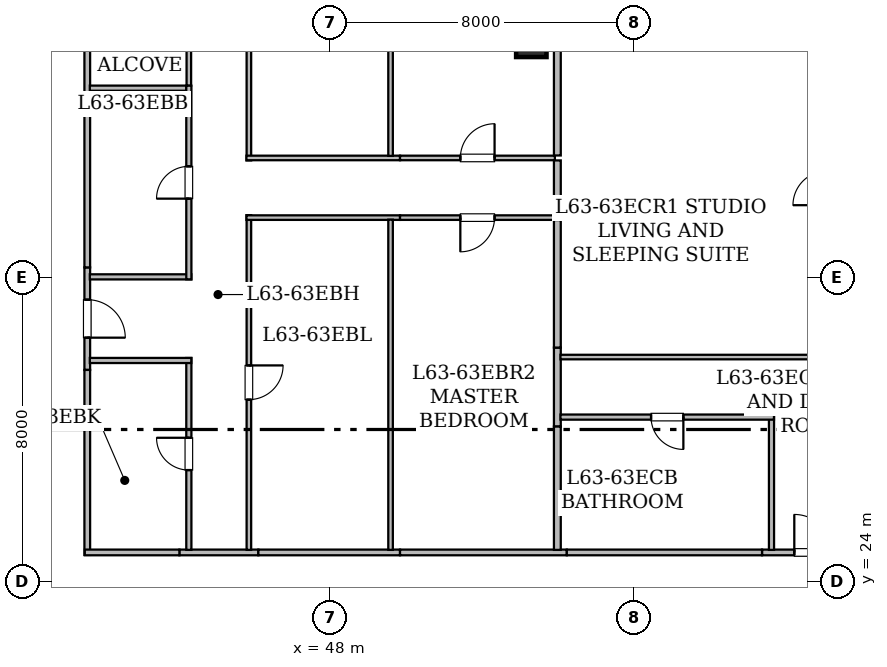
"""IFC4 building model, lengths in metres.
Left out: names, types, materials, properties, quantities, classifications, styles, units other than length and angle.
Written with IfcOpenShell. Run it as: python <this file> out.ifc"""

import sys

from ifc_helpers import new_model, si_unit, direction, frame, frame_2d, origin, origin_2d, place, context, subcontext, project, spatial, rectangle, hollow_rectangle, extrude, element, fill, save


model = new_model("IFC4")
c1 = context("Model", 3, precision=1e-05, world=origin(), true_north=direction((0.0, 1.0)))
c2 = subcontext(c1, "Body", "Model", "MODEL_VIEW")
j1 = project(units=[si_unit("LENGTHUNIT", "METRE"), si_unit("PLANEANGLEUNIT", "RADIAN")], contexts=[c1])
p1 = place(None, origin())
s1 = spatial("IfcSite", under=j1, at=p1, CompositionType="ELEMENT")
p2 = place(p1, origin())
s2 = spatial("IfcBuilding", under=s1, at=p2, CompositionType="ELEMENT")
p3 = place(p2, frame((0.0, 0.0, 246.4)))
s3 = spatial("IfcBuildingStorey", under=s2, at=p3, CompositionType="ELEMENT", Elevation=246.4)
p4 = place(p3, frame((53.3, 38.2, 0.0), z_axis=(0.0, 0.0, 1.0), x_axis=(1.0, 0.0, 0.0)))
e1 = element("IfcColumn", 1, at=p4, inside=s3, PredefinedType="COLUMN", context=c2, shape_type="SweptSolid", body=[
    extrude(hollow_rectangle(XDim=0.8, YDim=0.8, WallThickness=0.04, at=origin_2d()), origin(), (0.0, 0.0, 1.0), 3.65),
])
p5 = place(p3, frame((41.615, 39.1, 0.0), z_axis=(0.0, 0.0, 1.0), x_axis=(0.0, -1.0, 0.0)))
e2 = element("IfcWall", 2, at=p5, inside=s3, PredefinedType="STANDARD", context=c2, shape_type="SweptSolid", body=[
    extrude(rectangle(XDim=2.368, YDim=0.15, at=frame_2d((1.184, 0.0))), origin(), (0.0, 0.0, 1.0), 2.725),
])
p6 = place(p3, frame((41.615, 32.265, 0.0), z_axis=(0.0, 0.0, 1.0), x_axis=(0.0, -1.0, 0.0)))
e3 = element("IfcWall", 3, at=p6, inside=s3, PredefinedType="STANDARD", context=c2, shape_type="SweptSolid", body=[
    extrude(rectangle(XDim=2.698, YDim=0.15, at=frame_2d((1.349, 0.0))), origin(), (0.0, 0.0, 1.0), 3.43),
])
p7 = place(p6, frame((0.849, 0.0, 0.0)))
e4 = element("IfcOpeningElement", 4, at=p7, cuts=e3, PredefinedType="OPENING", context=c2, shape_type="SweptSolid", body=[
    extrude(rectangle(XDim=1.0, YDim=2.15, at=frame_2d((0.5, 1.075))), frame((0.0, 0.085, 0.0), z_axis=(0.0, -1.0, 0.0), x_axis=(1.0, 0.0, 0.0)), (0.0, 0.0, 1.0), 0.17),
])
p8 = place(p3, frame((44.039, 24.765, 0.0), z_axis=(0.0, 0.0, 1.0), x_axis=(1.0, 0.0, 0.0)))
e5 = element("IfcWall", 5, at=p8, inside=s3, PredefinedType="STANDARD", context=c2, shape_type="SweptSolid", body=[
    extrude(rectangle(XDim=2.078, YDim=0.15, at=frame_2d((1.039, 0.0))), origin(), (0.0, 0.0, 1.0), 3.43),
])
p9 = place(p3, frame((41.615, 36.732, 0.0), z_axis=(0.0, 0.0, 1.0), x_axis=(0.0, -1.0, 0.0)))
e6 = element("IfcWall", 6, at=p9, inside=s3, PredefinedType="STANDARD", context=c2, shape_type="SweptSolid", body=[
    extrude(rectangle(XDim=4.467, YDim=0.15, at=frame_2d((2.233, 0.0))), origin(), (0.0, 0.0, 1.0), 2.957),
])
p10 = place(p3, frame((41.615, 29.567, 0.0), z_axis=(0.0, 0.0, 1.0), x_axis=(0.0, -1.0, 0.0)))
e7 = element("IfcWall", 7, at=p10, inside=s3, PredefinedType="STANDARD", context=c2, shape_type="SweptSolid", body=[
    extrude(rectangle(XDim=4.867, YDim=0.15, at=frame_2d((2.434, 0.0))), origin(), (0.0, 0.0, 1.0), 3.43),
])
p11 = place(p3, frame((41.55, 24.765, 0.0), z_axis=(0.0, 0.0, 1.0), x_axis=(1.0, 0.0, 0.0)))
e8 = element("IfcWall", 8, at=p11, inside=s3, PredefinedType="STANDARD", context=c2, shape_type="SweptSolid", body=[
    extrude(rectangle(XDim=2.489, YDim=0.15, at=frame_2d((1.245, 0.0))), origin(), (0.0, 0.0, 1.0), 3.43),
])
p12 = place(p3, frame((46.117, 24.765, 0.0), z_axis=(0.0, 0.0, 1.0), x_axis=(1.0, 0.0, 0.0)))
e9 = element("IfcWall", 9, at=p12, inside=s3, PredefinedType="STANDARD", context=c2, shape_type="SweptSolid", body=[
    extrude(rectangle(XDim=3.728, YDim=0.15, at=frame_2d((1.864, 0.0))), origin(), (0.0, 0.0, 1.0), 3.43),
])
p13 = place(p3, frame((49.845, 24.765, 0.0), z_axis=(0.0, 0.0, 1.0), x_axis=(1.0, 0.0, 0.0)))
e10 = element("IfcWall", 10, at=p13, inside=s3, PredefinedType="STANDARD", context=c2, shape_type="SweptSolid", body=[
    extrude(rectangle(XDim=4.389, YDim=0.15, at=frame_2d((2.194, 0.0))), origin(), (0.0, 0.0, 1.0), 2.725),
])
p14 = place(p3, frame((59.371, 24.765, 0.0), z_axis=(0.0, 0.0, 1.0), x_axis=(1.0, 0.0, 0.0)))
e11 = element("IfcWall", 11, at=p14, inside=s3, PredefinedType="STANDARD", context=c2, shape_type="SweptSolid", body=[
    extrude(rectangle(XDim=2.698, YDim=0.15, at=frame_2d((1.349, 0.0))), origin(), (0.0, 0.0, 1.0), 3.43),
])
p15 = place(p14, frame((0.849, 0.0, 0.0)))
e12 = element("IfcOpeningElement", 12, at=p15, cuts=e11, PredefinedType="OPENING", context=c2, shape_type="SweptSolid", body=[
    extrude(rectangle(XDim=1.0, YDim=2.15, at=frame_2d((0.5, 1.075))), frame((0.0, 0.085, 0.0), z_axis=(0.0, -1.0, 0.0), x_axis=(1.0, 0.0, 0.0)), (0.0, 0.0, 1.0), 0.17),
])
p16 = place(p3, frame((54.234, 24.765, 0.0), z_axis=(0.0, 0.0, 1.0), x_axis=(1.0, 0.0, 0.0)))
e13 = element("IfcWall", 13, at=p16, inside=s3, PredefinedType="STANDARD", context=c2, shape_type="SweptSolid", body=[
    extrude(rectangle(XDim=5.137, YDim=0.15, at=frame_2d((2.569, 0.0))), origin(), (0.0, 0.0, 1.0), 3.43),
])
p17 = place(p3, frame((44.288, 43.808, 0.0), z_axis=(0.0, 0.0, 1.0), x_axis=(0.0, -1.0, 0.0)))
e14 = element("IfcWall", 14, at=p17, inside=s3, PredefinedType="PARTITIONING", context=c2, shape_type="SweptSolid", body=[
    extrude(rectangle(XDim=6.762, YDim=0.12, at=frame_2d((3.381, 0.0))), origin(), (0.0, 0.0, 1.0), 2.725),
])
p18 = place(p17, frame((2.931, 0.0, 0.0)))
e15 = element("IfcOpeningElement", 15, at=p18, cuts=e14, PredefinedType="OPENING", context=c2, shape_type="SweptSolid", body=[
    extrude(rectangle(XDim=0.9, YDim=2.1, at=frame_2d((0.45, 1.05))), frame((0.0, 0.07, 0.0), z_axis=(0.0, -1.0, 0.0), x_axis=(1.0, 0.0, 0.0)), (0.0, 0.0, 1.0), 0.14),
])
p19 = place(p3, frame((44.223, 36.981, 0.0), z_axis=(0.0, 0.0, 1.0), x_axis=(-1.0, 0.0, 0.0)))
e16 = element("IfcWall", 16, at=p19, inside=s3, PredefinedType="PARTITIONING", context=c2, shape_type="SweptSolid", body=[
    extrude(rectangle(XDim=2.541, YDim=0.135, at=frame_2d((1.271, 0.0))), origin(), (0.0, 0.0, 1.0), 2.725),
])
p20 = place(p3, frame((41.682, 32.016, 0.0), z_axis=(0.0, 0.0, 1.0), x_axis=(1.0, 0.0, 0.0)))
e17 = element("IfcWall", 17, at=p20, inside=s3, PredefinedType="PARTITIONING", context=c2, shape_type="SweptSolid", body=[
    extrude(rectangle(XDim=2.671, YDim=0.135, at=frame_2d((1.335, 0.0))), origin(), (0.0, 0.0, 1.0), 3.43),
])
p21 = place(p3, frame((44.288, 31.951, 0.0), z_axis=(0.0, 0.0, 1.0), x_axis=(0.0, 1.0, 0.0)))
e18 = element("IfcWall", 18, at=p21, inside=s3, PredefinedType="PARTITIONING", context=c2, shape_type="SweptSolid", body=[
    extrude(rectangle(XDim=5.095, YDim=0.135, at=frame_2d((2.547, 0.0))), origin(), (0.0, 0.0, 1.0), 2.957),
])
p22 = place(p21, frame((2.123, 0.0, 0.0)))
e19 = element("IfcOpeningElement", 19, at=p22, cuts=e18, PredefinedType="OPENING", context=c2, shape_type="SweptSolid", body=[
    extrude(rectangle(XDim=0.85, YDim=2.1, at=frame_2d((0.425, 1.05))), frame((0.0, 0.077, 0.0), z_axis=(0.0, -1.0, 0.0), x_axis=(1.0, 0.0, 0.0)), (0.0, 0.0, 1.0), 0.155),
])
p23 = place(p3, frame((44.288, 24.832, 0.0), z_axis=(0.0, 0.0, 1.0), x_axis=(0.0, 1.0, 0.0)))
e20 = element("IfcWall", 20, at=p23, inside=s3, PredefinedType="PARTITIONING", context=c2, shape_type="SweptSolid", body=[
    extrude(rectangle(XDim=5.049, YDim=0.135, at=frame_2d((2.524, 0.0))), origin(), (0.0, 0.0, 1.0), 3.43),
])
p24 = place(p23, frame((2.1, 0.0, 0.0)))
e21 = element("IfcOpeningElement", 21, at=p24, cuts=e20, PredefinedType="OPENING", context=c2, shape_type="SweptSolid", body=[
    extrude(rectangle(XDim=0.85, YDim=2.1, at=frame_2d((0.425, 1.05))), frame((0.0, 0.077, 0.0), z_axis=(0.0, -1.0, 0.0), x_axis=(1.0, 0.0, 0.0)), (0.0, 0.0, 1.0), 0.155),
])
p25 = place(p3, frame((44.353, 29.816, 0.0), z_axis=(0.0, 0.0, 1.0), x_axis=(-1.0, 0.0, 0.0)))
e22 = element("IfcWall", 22, at=p25, inside=s3, PredefinedType="PARTITIONING", context=c2, shape_type="SweptSolid", body=[
    extrude(rectangle(XDim=2.671, YDim=0.135, at=frame_2d((1.335, 0.0))), origin(), (0.0, 0.0, 1.0), 3.43),
])
p26 = place(p3, frame((45.868, 33.64, 0.0), z_axis=(0.0, 0.0, 1.0), x_axis=(0.0, -1.0, 0.0)))
e23 = element("IfcWall", 23, at=p26, inside=s3, PredefinedType="PARTITIONING", context=c2, shape_type="SweptSolid", body=[
    extrude(rectangle(XDim=8.808, YDim=0.12, at=frame_2d((4.404, 0.0))), origin(), (0.0, 0.0, 1.0), 2.957),
])
p27 = place(p26, frame((3.954, 0.0, 0.0)))
e24 = element("IfcOpeningElement", 24, at=p27, cuts=e23, PredefinedType="OPENING", context=c2, shape_type="SweptSolid", body=[
    extrude(rectangle(XDim=0.9, YDim=2.1, at=frame_2d((0.45, 1.05))), frame((0.0, 0.07, 0.0), z_axis=(0.0, -1.0, 0.0), x_axis=(1.0, 0.0, 0.0)), (0.0, 0.0, 1.0), 0.14),
])
p28 = place(p3, frame((49.845, 33.575, 0.0), z_axis=(0.0, 0.0, 1.0), x_axis=(-1.0, 0.0, 0.0)))
e25 = element("IfcWall", 25, at=p28, inside=s3, PredefinedType="PARTITIONING", context=c2, shape_type="SweptSolid", body=[
    extrude(rectangle(XDim=4.042, YDim=0.12, at=frame_2d((2.021, 0.0))), origin(), (0.0, 0.0, 1.0), 2.957),
])
p29 = place(p3, frame((53.92, 33.575, 0.0), z_axis=(0.0, 0.0, 1.0), x_axis=(-1.0, 0.0, 0.0)))
e26 = element("IfcWall", 26, at=p29, inside=s3, PredefinedType="PARTITIONING", context=c2, shape_type="SweptSolid", body=[
    extrude(rectangle(XDim=4.075, YDim=0.12, at=frame_2d((2.038, 0.0))), origin(), (0.0, 0.0, 1.0), 2.725),
])
p30 = place(p29, frame((1.588, 0.0, 0.0)))
e27 = element("IfcOpeningElement", 27, at=p30, cuts=e26, PredefinedType="OPENING", context=c2, shape_type="SweptSolid", body=[
    extrude(rectangle(XDim=0.9, YDim=2.1, at=frame_2d((0.45, 1.05))), frame((0.0, 0.07, 0.0), z_axis=(0.0, -1.0, 0.0), x_axis=(1.0, 0.0, 0.0)), (0.0, 0.0, 1.0), 0.14),
])
p31 = place(p3, frame((45.868, 43.808, 0.0), z_axis=(0.0, 0.0, 1.0), x_axis=(0.0, -1.0, 0.0)))
e28 = element("IfcWall", 28, at=p31, inside=s3, PredefinedType="PARTITIONING", context=c2, shape_type="SweptSolid", body=[
    extrude(rectangle(XDim=8.728, YDim=0.12, at=frame_2d((4.364, 0.0))), origin(), (0.0, 0.0, 1.0), 2.725),
])
p32 = place(p31, frame((3.914, 0.0, 0.0)))
e29 = element("IfcOpeningElement", 29, at=p32, cuts=e28, PredefinedType="OPENING", context=c2, shape_type="SweptSolid", body=[
    extrude(rectangle(XDim=0.9, YDim=2.1, at=frame_2d((0.45, 1.05))), frame((0.0, 0.07, 0.0), z_axis=(0.0, -1.0, 0.0), x_axis=(1.0, 0.0, 0.0)), (0.0, 0.0, 1.0), 0.14),
])
p33 = place(p3, frame((45.803, 35.145, 0.0), z_axis=(0.0, 0.0, 1.0), x_axis=(1.0, 0.0, 0.0)))
e30 = element("IfcWall", 30, at=p33, inside=s3, PredefinedType="PARTITIONING", context=c2, shape_type="SweptSolid", body=[
    extrude(rectangle(XDim=4.042, YDim=0.12, at=frame_2d((2.021, 0.0))), origin(), (0.0, 0.0, 1.0), 3.43),
])
p34 = place(p3, frame((49.845, 35.145, 0.0), z_axis=(0.0, 0.0, 1.0), x_axis=(1.0, 0.0, 0.0)))
e31 = element("IfcWall", 31, at=p34, inside=s3, PredefinedType="PARTITIONING", context=c2, shape_type="SweptSolid", body=[
    extrude(rectangle(XDim=4.075, YDim=0.12, at=frame_2d((2.038, 0.0))), origin(), (0.0, 0.0, 1.0), 2.725),
])
p35 = place(p34, frame((1.588, 0.0, 0.0)))
e32 = element("IfcOpeningElement", 32, at=p35, cuts=e31, PredefinedType="OPENING", context=c2, shape_type="SweptSolid", body=[
    extrude(rectangle(XDim=0.9, YDim=2.1, at=frame_2d((0.45, 1.05))), frame((0.0, 0.07, 0.0), z_axis=(0.0, -1.0, 0.0), x_axis=(1.0, 0.0, 0.0)), (0.0, 0.0, 1.0), 0.14),
])
p36 = place(p3, frame((53.985, 35.08, 0.0), z_axis=(0.0, 0.0, 1.0), x_axis=(0.0, -1.0, 0.0)))
e33 = element("IfcWall", 33, at=p36, inside=s3, PredefinedType="STANDARD", context=c2, shape_type="SweptSolid", body=[
    extrude(rectangle(XDim=1.44, YDim=0.18, at=frame_2d((0.72, 0.0))), origin(), (0.0, 0.0, 1.0), 2.687),
])
p37 = place(p3, frame((49.596, 33.521, 0.0), z_axis=(0.0, 0.0, 1.0), x_axis=(0.0, -1.0, 0.0)))
e34 = element("IfcWall", 34, at=p37, inside=s3, PredefinedType="PARTITIONING", context=c2, shape_type="SweptSolid", body=[
    extrude(rectangle(XDim=8.689, YDim=0.12, at=frame_2d((4.344, 0.0))), origin(), (0.0, 0.0, 1.0), 2.957),
])
p38 = place(p3, frame((53.985, 30.155, 0.0), z_axis=(0.0, 0.0, 1.0), x_axis=(0.0, -1.0, 0.0)))
e35 = element("IfcWall", 35, at=p38, inside=s3, PredefinedType="STANDARD", context=c2, shape_type="SweptSolid", body=[
    extrude(rectangle(XDim=2.078, YDim=0.18, at=frame_2d((1.039, 0.0))), origin(), (0.0, 0.0, 1.0), 3.43),
])
p39 = place(p3, frame((53.985, 28.077, 0.0), z_axis=(0.0, 0.0, 1.0), x_axis=(0.0, -1.0, 0.0)))
e36 = element("IfcWall", 36, at=p39, inside=s3, PredefinedType="STANDARD", context=c2, shape_type="SweptSolid", body=[
    extrude(rectangle(XDim=3.245, YDim=0.18, at=frame_2d((1.623, 0.0))), origin(), (0.0, 0.0, 1.0), 3.43),
])
p40 = place(p3, frame((53.985, 33.51, 0.0), z_axis=(0.0, 0.0, 1.0), x_axis=(0.0, -1.0, 0.0)))
e37 = element("IfcWall", 37, at=p40, inside=s3, PredefinedType="STANDARD", context=c2, shape_type="SweptSolid", body=[
    extrude(rectangle(XDim=3.355, YDim=0.18, at=frame_2d((1.677, 0.0))), origin(), (0.0, 0.0, 1.0), 2.687),
])
p41 = place(p3, frame((49.596, 43.808, 0.0), z_axis=(0.0, 0.0, 1.0), x_axis=(0.0, -1.0, 0.0)))
e38 = element("IfcWall", 38, at=p41, inside=s3, PredefinedType="PARTITIONING", context=c2, shape_type="SweptSolid", body=[
    extrude(rectangle(XDim=8.609, YDim=0.12, at=frame_2d((4.305, 0.0))), origin(), (0.0, 0.0, 1.0), 2.725),
])
p42 = place(p3, frame((53.985, 38.906, 0.0), z_axis=(0.0, 0.0, 1.0), x_axis=(0.0, -1.0, 0.0)))
e39 = element("IfcWall", 39, at=p42, inside=s3, PredefinedType="STANDARD", context=c2, shape_type="SweptSolid", body=[
    extrude(rectangle(XDim=3.696, YDim=0.18, at=frame_2d((1.848, 0.0))), origin(), (0.0, 0.0, 1.0), 2.725),
])
p43 = place(p3, frame((59.62, 24.832, 0.0), z_axis=(0.0, 0.0, 1.0), x_axis=(0.0, 1.0, 0.0)))
e40 = element("IfcWall", 40, at=p43, inside=s3, PredefinedType="PARTITIONING", context=c2, shape_type="SweptSolid", body=[
    extrude(rectangle(XDim=3.559, YDim=0.135, at=frame_2d((1.78, 0.0))), origin(), (0.0, 0.0, 1.0), 3.43),
])
p44 = place(p3, frame((59.685, 28.326, 0.0), z_axis=(0.0, 0.0, 1.0), x_axis=(-1.0, 0.0, 0.0)))
e41 = element("IfcWall", 41, at=p44, inside=s3, PredefinedType="PARTITIONING", context=c2, shape_type="SweptSolid", body=[
    extrude(rectangle(XDim=5.618, YDim=0.135, at=frame_2d((2.809, 0.0))), origin(), (0.0, 0.0, 1.0), 3.43),
])
p45 = place(p44, frame((2.384, 0.0, 0.0)))
e42 = element("IfcOpeningElement", 42, at=p45, cuts=e41, PredefinedType="OPENING", context=c2, shape_type="SweptSolid", body=[
    extrude(rectangle(XDim=0.85, YDim=2.1, at=frame_2d((0.425, 1.05))), frame((0.0, 0.077, 0.0), z_axis=(0.0, -1.0, 0.0), x_axis=(1.0, 0.0, 0.0)), (0.0, 0.0, 1.0), 0.155),
])
p46 = place(p3, frame((54.067, 29.906, 0.0), z_axis=(0.0, 0.0, 1.0), x_axis=(1.0, 0.0, 0.0)))
e43 = element("IfcWall", 43, at=p46, inside=s3, PredefinedType="PARTITIONING", context=c2, shape_type="SweptSolid", body=[
    extrude(rectangle(XDim=7.083, YDim=0.12, at=frame_2d((3.542, 0.0))), origin(), (0.0, 0.0, 1.0), 3.43),
])
p47 = place(p7, origin())
e44 = element("IfcDoor", 44, at=p47, inside=s3, OperationType="SINGLE_SWING_RIGHT", PredefinedType="DOOR", context=c2, shape_type="SweptSolid", body=[
    extrude(rectangle(XDim=1.0, YDim=2.15, at=frame_2d((0.5, 1.075))), frame((0.0, 0.025, 0.0), z_axis=(0.0, -1.0, 0.0), x_axis=(1.0, 0.0, 0.0)), (0.0, 0.0, 1.0), 0.05),
])
fill(e4, e44)
p48 = place(p15, origin())
e45 = element("IfcDoor", 45, at=p48, inside=s3, OperationType="SINGLE_SWING_LEFT", PredefinedType="DOOR", context=c2, shape_type="SweptSolid", body=[
    extrude(rectangle(XDim=1.0, YDim=2.15, at=frame_2d((0.5, 1.075))), frame((0.0, 0.025, 0.0), z_axis=(0.0, -1.0, 0.0), x_axis=(1.0, 0.0, 0.0)), (0.0, 0.0, 1.0), 0.05),
])
fill(e12, e45)
p49 = place(p22, origin())
e46 = element("IfcDoor", 46, at=p49, inside=s3, OperationType="SINGLE_SWING_LEFT", PredefinedType="DOOR", context=c2, shape_type="SweptSolid", body=[
    extrude(rectangle(XDim=0.85, YDim=2.1, at=frame_2d((0.425, 1.05))), frame((0.0, 0.025, 0.0), z_axis=(0.0, -1.0, 0.0), x_axis=(1.0, 0.0, 0.0)), (0.0, 0.0, 1.0), 0.05),
])
fill(e19, e46)
p50 = place(p24, origin())
e47 = element("IfcDoor", 47, at=p50, inside=s3, OperationType="SINGLE_SWING_RIGHT", PredefinedType="DOOR", context=c2, shape_type="SweptSolid", body=[
    extrude(rectangle(XDim=0.85, YDim=2.1, at=frame_2d((0.425, 1.05))), frame((0.0, 0.025, 0.0), z_axis=(0.0, -1.0, 0.0), x_axis=(1.0, 0.0, 0.0)), (0.0, 0.0, 1.0), 0.05),
])
fill(e21, e47)
p51 = place(p27, origin())
e48 = element("IfcDoor", 48, at=p51, inside=s3, OperationType="SINGLE_SWING_LEFT", PredefinedType="DOOR", context=c2, shape_type="SweptSolid", body=[
    extrude(rectangle(XDim=0.9, YDim=2.1, at=frame_2d((0.45, 1.05))), frame((0.0, 0.025, 0.0), z_axis=(0.0, -1.0, 0.0), x_axis=(1.0, 0.0, 0.0)), (0.0, 0.0, 1.0), 0.05),
])
fill(e24, e48)
p52 = place(p30, origin())
e49 = element("IfcDoor", 49, at=p52, inside=s3, OperationType="SINGLE_SWING_RIGHT", PredefinedType="DOOR", context=c2, shape_type="SweptSolid", body=[
    extrude(rectangle(XDim=0.9, YDim=2.1, at=frame_2d((0.45, 1.05))), frame((0.0, 0.025, 0.0), z_axis=(0.0, -1.0, 0.0), x_axis=(1.0, 0.0, 0.0)), (0.0, 0.0, 1.0), 0.05),
])
fill(e27, e49)
p53 = place(p35, origin())
e50 = element("IfcDoor", 50, at=p53, inside=s3, OperationType="SINGLE_SWING_RIGHT", PredefinedType="DOOR", context=c2, shape_type="SweptSolid", body=[
    extrude(rectangle(XDim=0.9, YDim=2.1, at=frame_2d((0.45, 1.05))), frame((0.0, 0.025, 0.0), z_axis=(0.0, -1.0, 0.0), x_axis=(1.0, 0.0, 0.0)), (0.0, 0.0, 1.0), 0.05),
])
fill(e32, e50)
p54 = place(p45, origin())
e51 = element("IfcDoor", 51, at=p54, inside=s3, OperationType="SINGLE_SWING_LEFT", PredefinedType="DOOR", context=c2, shape_type="SweptSolid", body=[
    extrude(rectangle(XDim=0.85, YDim=2.1, at=frame_2d((0.425, 1.05))), frame((0.0, 0.025, 0.0), z_axis=(0.0, -1.0, 0.0), x_axis=(1.0, 0.0, 0.0)), (0.0, 0.0, 1.0), 0.05),
])
fill(e42, e51)
save(model, sys.argv[1])
